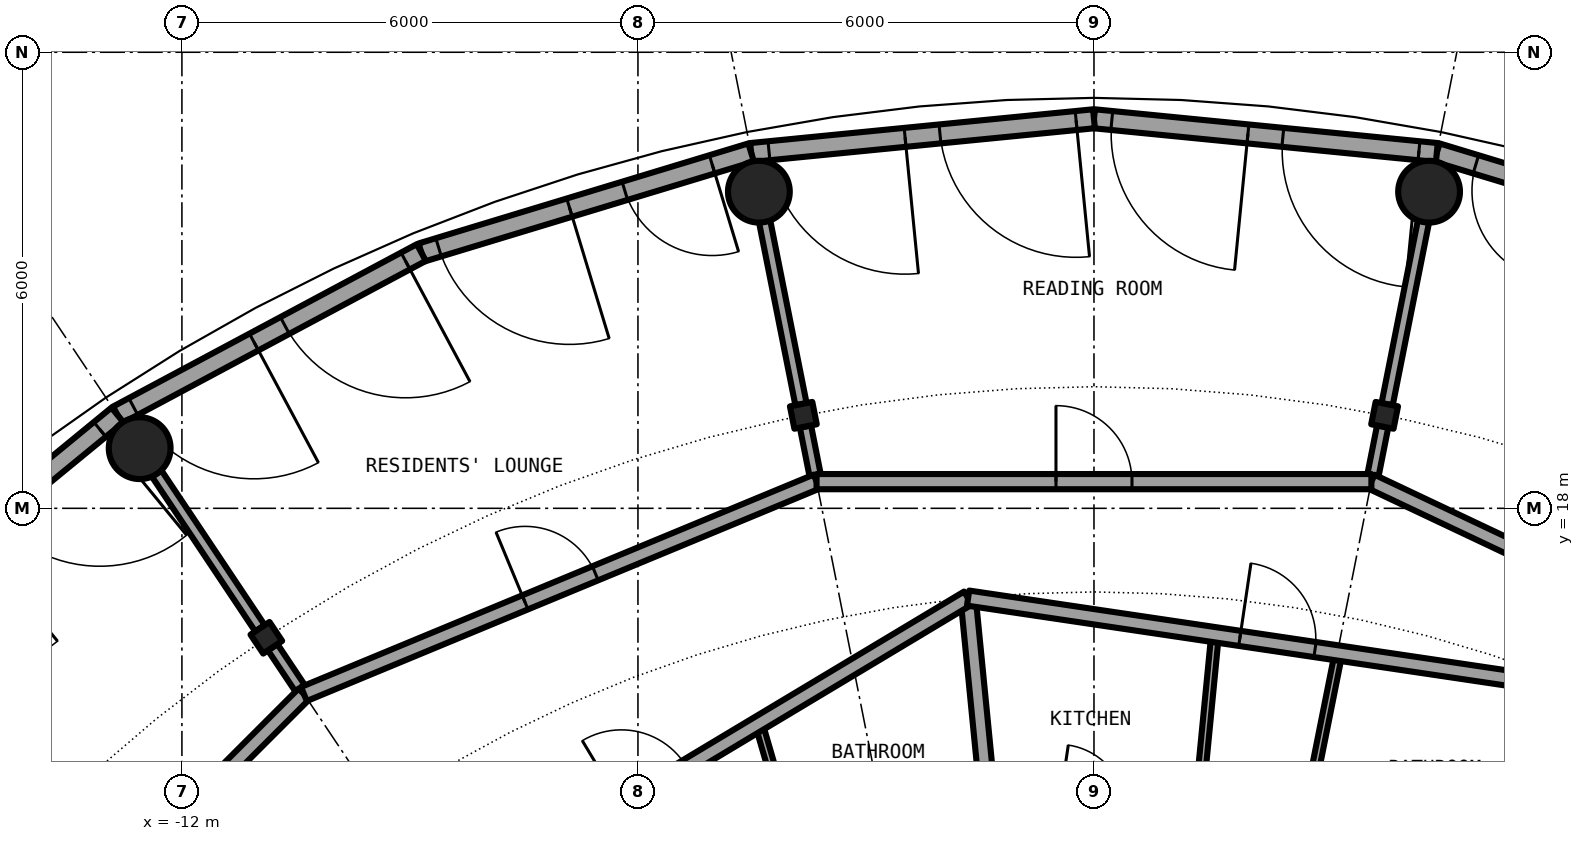
"""IFC4 building model, lengths in metres.
Left out: names, types, materials, properties, quantities, classifications, styles, units other than length and angle.
Written with IfcOpenShell. Run it as: python <this file> out.ifc"""

import sys

from ifc_helpers import new_model, si_unit, direction, frame, frame_2d, origin, origin_2d, place, context, subcontext, project, spatial, rectangle, hollow_circle, i_section, extrude, element, fill, save


model = new_model("IFC4")
c1 = context("Model", 3, precision=1e-05, world=origin(), true_north=direction((0.0, 1.0)))
c2 = subcontext(c1, "Body", "Model", "MODEL_VIEW")
j1 = project(units=[si_unit("LENGTHUNIT", "METRE"), si_unit("PLANEANGLEUNIT", "RADIAN")], contexts=[c1])
p1 = place(None, origin())
s1 = spatial("IfcSite", under=j1, at=p1, CompositionType="ELEMENT")
p2 = place(p1, origin())
s2 = spatial("IfcBuilding", under=s1, at=p2, CompositionType="ELEMENT")
p3 = place(p2, frame((0.0, 0.0, 249.3)))
s3 = spatial("IfcBuildingStorey", under=s2, at=p3, CompositionType="ELEMENT", Elevation=249.3)
for number, where, z_axis, x_axis in (
    (1, (4.409, 22.166, 0.0), (0.0, 0.0, 1.0), (1.0, 0.0, 0.0)),
    (2, (-4.409, 22.166, 0.0), (0.0, 0.0, 1.0), (1.0, 0.0, 0.0)),
    (3, (-12.556, 18.791, 0.0), (0.0, 0.0, 1.0), (1.0, 0.0, 0.0)),
):
    element("IfcColumn", number, at=place(p3, frame(where, z_axis=z_axis, x_axis=x_axis)), inside=s3, PredefinedType="COLUMN", context=c2, shape_type="SweptSolid", body=[
        extrude(hollow_circle(Radius=0.406, WallThickness=0.03, at=origin_2d()), origin(), (0.0, 0.0, 1.0), 3.05),
    ])
for number, where, z_axis, x_axis in (
    (4, (3.824, 19.223, 0.0), (0.0, 0.0, 1.0), (0.195, 0.981, 0.0)),
    (5, (-3.824, 19.223, 0.0), (0.0, 0.0, 1.0), (-0.195, 0.981, 0.0)),
    (6, (-10.889, 16.297, 0.0), (0.0, 0.0, 1.0), (-0.556, 0.831, 0.0)),
):
    element("IfcColumn", number, at=place(p3, frame(where, z_axis=z_axis, x_axis=x_axis)), inside=s3, PredefinedType="COLUMN", context=c2, shape_type="SweptSolid", body=[
        extrude(i_section(OverallWidth=0.3, OverallDepth=0.3, WebThickness=0.011, FlangeThickness=0.019, FilletRadius=0.027, at=origin_2d()), origin(), (0.0, 0.0, 1.0), 3.05),
    ])
p4 = place(p3, frame((8.85, 21.365, 0.0), z_axis=(0.0, 0.0, 1.0), x_axis=(-0.956960982965, 0.290216603735, 0.0)))
e7 = element("IfcWall", 7, at=p4, inside=s3, PredefinedType="SOLIDWALL", context=c2, shape_type="SweptSolid", body=[
    extrude(rectangle(XDim=4.534, YDim=0.25, at=frame_2d((2.267, 0.0))), origin(), (0.0, 0.0, 1.0), 2.7),
])
p5 = place(p4, frame((0.236, 0.0, 0.0)))
e8 = element("IfcOpeningElement", 8, at=p5, cuts=e7, PredefinedType="OPENING", context=c2, shape_type="SweptSolid", body=[
    extrude(rectangle(XDim=1.8, YDim=2.2, at=frame_2d((0.9, 1.1))), frame((0.0, 0.135, 0.0), z_axis=(0.0, -1.0, 0.0), x_axis=(1.0, 0.0, 0.0)), (0.0, 0.0, 1.0), 0.27),
])
p6 = place(p4, frame((2.797, 0.0, 0.0)))
e9 = element("IfcOpeningElement", 9, at=p6, cuts=e7, PredefinedType="OPENING", context=c2, shape_type="SweptSolid", body=[
    extrude(rectangle(XDim=1.2, YDim=2.2, at=frame_2d((0.6, 1.1))), frame((0.0, 0.135, 0.0), z_axis=(0.0, -1.0, 0.0), x_axis=(1.0, 0.0, 0.0)), (0.0, 0.0, 1.0), 0.27),
])
p7 = place(p3, frame((4.511, 22.681, 0.0), z_axis=(0.0, 0.0, 1.0), x_axis=(-0.995189063612, 0.097973096645, 0.0)))
e10 = element("IfcWall", 10, at=p7, inside=s3, PredefinedType="SOLIDWALL", context=c2, shape_type="SweptSolid", body=[
    extrude(rectangle(XDim=4.533, YDim=0.25, at=frame_2d((2.266, 0.0))), origin(), (0.0, 0.0, 1.0), 2.7),
])
p8 = place(p7, frame((0.236, 0.0, 0.0)))
e11 = element("IfcOpeningElement", 11, at=p8, cuts=e10, PredefinedType="OPENING", context=c2, shape_type="SweptSolid", body=[
    extrude(rectangle(XDim=1.8, YDim=2.2, at=frame_2d((0.9, 1.1))), frame((0.0, 0.135, 0.0), z_axis=(0.0, -1.0, 0.0), x_axis=(1.0, 0.0, 0.0)), (0.0, 0.0, 1.0), 0.27),
])
p9 = place(p7, frame((2.497, 0.0, 0.0)))
e12 = element("IfcOpeningElement", 12, at=p9, cuts=e10, PredefinedType="OPENING", context=c2, shape_type="SweptSolid", body=[
    extrude(rectangle(XDim=1.8, YDim=2.2, at=frame_2d((0.9, 1.1))), frame((0.0, 0.135, 0.0), z_axis=(0.0, -1.0, 0.0), x_axis=(1.0, 0.0, 0.0)), (0.0, 0.0, 1.0), 0.27),
])
p10 = place(p3, frame((0.0, 23.125, 0.0), z_axis=(0.0, 0.0, 1.0), x_axis=(-0.995189063612, -0.097973096645, 0.0)))
e13 = element("IfcWall", 13, at=p10, inside=s3, PredefinedType="SOLIDWALL", context=c2, shape_type="SweptSolid", body=[
    extrude(rectangle(XDim=4.533, YDim=0.25, at=frame_2d((2.266, 0.0))), origin(), (0.0, 0.0, 1.0), 2.7),
])
p11 = place(p10, frame((0.236, 0.0, 0.0)))
e14 = element("IfcOpeningElement", 14, at=p11, cuts=e13, PredefinedType="OPENING", context=c2, shape_type="SweptSolid", body=[
    extrude(rectangle(XDim=1.8, YDim=2.2, at=frame_2d((0.9, 1.1))), frame((0.0, 0.135, 0.0), z_axis=(0.0, -1.0, 0.0), x_axis=(1.0, 0.0, 0.0)), (0.0, 0.0, 1.0), 0.27),
])
p12 = place(p10, frame((2.497, 0.0, 0.0)))
e15 = element("IfcOpeningElement", 15, at=p12, cuts=e13, PredefinedType="OPENING", context=c2, shape_type="SweptSolid", body=[
    extrude(rectangle(XDim=1.8, YDim=2.2, at=frame_2d((0.9, 1.1))), frame((0.0, 0.135, 0.0), z_axis=(0.0, -1.0, 0.0), x_axis=(1.0, 0.0, 0.0)), (0.0, 0.0, 1.0), 0.27),
])
p13 = place(p3, frame((-4.511, 22.681, 0.0), z_axis=(0.0, 0.0, 1.0), x_axis=(-0.956960982965, -0.290216603735, 0.0)))
e16 = element("IfcWall", 16, at=p13, inside=s3, PredefinedType="SOLIDWALL", context=c2, shape_type="SweptSolid", body=[
    extrude(rectangle(XDim=4.534, YDim=0.25, at=frame_2d((2.267, 0.0))), origin(), (0.0, 0.0, 1.0), 2.7),
])
p14 = place(p13, frame((0.536, 0.0, 0.0)))
e17 = element("IfcOpeningElement", 17, at=p14, cuts=e16, PredefinedType="OPENING", context=c2, shape_type="SweptSolid", body=[
    extrude(rectangle(XDim=1.2, YDim=2.2, at=frame_2d((0.6, 1.1))), frame((0.0, 0.135, 0.0), z_axis=(0.0, -1.0, 0.0), x_axis=(1.0, 0.0, 0.0)), (0.0, 0.0, 1.0), 0.27),
])
p15 = place(p13, frame((2.497, 0.0, 0.0)))
e18 = element("IfcOpeningElement", 18, at=p15, cuts=e16, PredefinedType="OPENING", context=c2, shape_type="SweptSolid", body=[
    extrude(rectangle(XDim=1.8, YDim=2.2, at=frame_2d((0.9, 1.1))), frame((0.0, 0.135, 0.0), z_axis=(0.0, -1.0, 0.0), x_axis=(1.0, 0.0, 0.0)), (0.0, 0.0, 1.0), 0.27),
])
p16 = place(p3, frame((-8.85, 21.365, 0.0), z_axis=(0.0, 0.0, 1.0), x_axis=(-0.881912752543, -0.471412660947, 0.0)))
e19 = element("IfcWall", 19, at=p16, inside=s3, PredefinedType="SOLIDWALL", context=c2, shape_type="SweptSolid", body=[
    extrude(rectangle(XDim=4.533, YDim=0.25, at=frame_2d((2.267, 0.0))), origin(), (0.0, 0.0, 1.0), 2.7),
])
p17 = place(p16, frame((0.236, 0.0, 0.0)))
e20 = element("IfcOpeningElement", 20, at=p17, cuts=e19, PredefinedType="OPENING", context=c2, shape_type="SweptSolid", body=[
    extrude(rectangle(XDim=1.8, YDim=2.2, at=frame_2d((0.9, 1.1))), frame((0.0, 0.135, 0.0), z_axis=(0.0, -1.0, 0.0), x_axis=(1.0, 0.0, 0.0)), (0.0, 0.0, 1.0), 0.27),
])
p18 = place(p16, frame((2.497, 0.0, 0.0)))
e21 = element("IfcOpeningElement", 21, at=p18, cuts=e19, PredefinedType="OPENING", context=c2, shape_type="SweptSolid", body=[
    extrude(rectangle(XDim=1.8, YDim=2.2, at=frame_2d((0.9, 1.1))), frame((0.0, 0.135, 0.0), z_axis=(0.0, -1.0, 0.0), x_axis=(1.0, 0.0, 0.0)), (0.0, 0.0, 1.0), 0.27),
])
p19 = place(p3, frame((-12.848, 19.228, 0.0), z_axis=(0.0, 0.0, 1.0), x_axis=(-0.772989395532, -0.634418942337, 0.0)))
e22 = element("IfcWall", 22, at=p19, inside=s3, PredefinedType="SOLIDWALL", context=c2, shape_type="SweptSolid", body=[
    extrude(rectangle(XDim=4.533, YDim=0.25, at=frame_2d((2.267, 0.0))), origin(), (0.0, 0.0, 1.0), 2.7),
])
p20 = place(p19, frame((0.3, 0.0, 0.0)))
e23 = element("IfcOpeningElement", 23, at=p20, cuts=e22, PredefinedType="OPENING", context=c2, shape_type="SweptSolid", body=[
    extrude(rectangle(XDim=1.8, YDim=2.2, at=frame_2d((0.9, 1.1))), frame((0.0, 0.135, 0.0), z_axis=(0.0, -1.0, 0.0), x_axis=(1.0, 0.0, 0.0)), (0.0, 0.0, 1.0), 0.27),
])
p21 = place(p19, frame((2.497, 0.0, 0.0)))
e24 = element("IfcOpeningElement", 24, at=p21, cuts=e22, PredefinedType="OPENING", context=c2, shape_type="SweptSolid", body=[
    extrude(rectangle(XDim=1.8, YDim=2.2, at=frame_2d((0.9, 1.1))), frame((0.0, 0.135, 0.0), z_axis=(0.0, -1.0, 0.0), x_axis=(1.0, 0.0, 0.0)), (0.0, 0.0, 1.0), 0.27),
])
p22 = place(p3, frame((-12.334, 18.46, 0.0), z_axis=(0.0, 0.0, 1.0), x_axis=(0.55541269892, -0.831574851639, 0.0)))
e25 = element("IfcWall", 25, at=p22, inside=s3, PredefinedType="PARTITIONING", context=c2, shape_type="SweptSolid", body=[
    extrude(rectangle(XDim=2.451, YDim=0.15, at=frame_2d((1.225, 0.0))), origin(), (0.0, 0.0, 1.0), 2.7),
])
p23 = place(p3, frame((-10.806, 16.172, 0.0), z_axis=(0.0, 0.0, 1.0), x_axis=(0.55538538696, -0.831593092775, 0.0)))
e26 = element("IfcWall", 26, at=p23, inside=s3, PredefinedType="PARTITIONING", context=c2, shape_type="SweptSolid", body=[
    extrude(rectangle(XDim=0.74, YDim=0.15, at=frame_2d((0.37, 0.0))), origin(), (0.0, 0.0, 1.0), 2.7),
])
p24 = place(p3, frame((-4.411, 15.168, 0.0), z_axis=(0.0, 0.0, 1.0), x_axis=(0.279201466266, -0.960232545395, 0.0)))
e27 = element("IfcWall", 27, at=p24, inside=s3, PredefinedType="PARTITIONING", context=c2, shape_type="SweptSolid", body=[
    extrude(rectangle(XDim=2.524, YDim=0.1, at=frame_2d((1.262, 0.0))), origin(), (0.0, 0.0, 1.0), 2.7),
])
p25 = place(p3, frame((-4.333, 21.774, 0.0), z_axis=(0.0, 0.0, 1.0), x_axis=(0.195043256877, -0.980794641068, 0.0)))
e28 = element("IfcWall", 28, at=p25, inside=s3, PredefinedType="PARTITIONING", context=c2, shape_type="SweptSolid", body=[
    extrude(rectangle(XDim=2.451, YDim=0.15, at=frame_2d((1.226, 0.0))), origin(), (0.0, 0.0, 1.0), 2.7),
])
p26 = place(p3, frame((-3.796, 19.076, 0.0), z_axis=(0.0, 0.0, 1.0), x_axis=(0.194591088663, -0.980884452019, 0.0)))
e29 = element("IfcWall", 29, at=p26, inside=s3, PredefinedType="PARTITIONING", context=c2, shape_type="SweptSolid", body=[
    extrude(rectangle(XDim=0.739, YDim=0.15, at=frame_2d((0.37, 0.0))), origin(), (0.0, 0.0, 1.0), 2.7),
])
p27 = place(p3, frame((-1.656, 16.819, 0.0), z_axis=(0.0, 0.0, 1.0), x_axis=(0.097815726767, -0.995204543597, 0.0)))
e30 = element("IfcWall", 30, at=p27, inside=s3, PredefinedType="PARTITIONING", context=c2, shape_type="SweptSolid", body=[
    extrude(rectangle(XDim=9.18, YDim=0.2, at=frame_2d((4.59, 0.0))), origin(), (0.0, 0.0, 1.0), 2.7),
])
p28 = place(p3, frame((1.339, 13.727, 0.0), z_axis=(0.0, 0.0, 1.0), x_axis=(0.096830025237, 0.995300932489, 0.0)))
e31 = element("IfcWall", 31, at=p28, inside=s3, PredefinedType="PARTITIONING", context=c2, shape_type="SweptSolid", body=[
    extrude(rectangle(XDim=2.622, YDim=0.1, at=frame_2d((1.311, 0.0))), origin(), (0.0, 0.0, 1.0), 2.7),
])
p29 = place(p3, frame((2.704, 13.524, 0.0), z_axis=(0.0, 0.0, 1.0), x_axis=(0.195937128464, 0.980616460034, 0.0)))
e32 = element("IfcWall", 32, at=p29, inside=s3, PredefinedType="PARTITIONING", context=c2, shape_type="SweptSolid", body=[
    extrude(rectangle(XDim=2.623, YDim=0.1, at=frame_2d((1.312, 0.0))), origin(), (0.0, 0.0, 1.0), 2.7),
])
p30 = place(p3, frame((2.955, 7.132, 0.0), z_axis=(0.0, 0.0, 1.0), x_axis=(0.382556139466, 0.923932248683, 0.0)))
e33 = element("IfcWall", 33, at=p30, inside=s3, PredefinedType="PARTITIONING", context=c2, shape_type="SweptSolid", body=[
    extrude(rectangle(XDim=9.18, YDim=0.2, at=frame_2d((4.59, 0.0))), origin(), (0.0, 0.0, 1.0), 2.7),
])
p31 = place(p3, frame((3.654, 18.35, 0.0), z_axis=(0.0, 0.0, 1.0), x_axis=(0.194656627734, 0.980871447887, 0.0)))
e34 = element("IfcWall", 34, at=p31, inside=s3, PredefinedType="PARTITIONING", context=c2, shape_type="SweptSolid", body=[
    extrude(rectangle(XDim=0.74, YDim=0.15, at=frame_2d((0.37, 0.0))), origin(), (0.0, 0.0, 1.0), 2.7),
])
p32 = place(p3, frame((3.857, 19.37, 0.0), z_axis=(0.0, 0.0, 1.0), x_axis=(0.195043256877, 0.980794641068, 0.0)))
e35 = element("IfcWall", 35, at=p32, inside=s3, PredefinedType="PARTITIONING", context=c2, shape_type="SweptSolid", body=[
    extrude(rectangle(XDim=2.451, YDim=0.15, at=frame_2d((1.226, 0.0))), origin(), (0.0, 0.0, 1.0), 2.7),
])
p33 = place(p3, frame((-14.052, 9.389, 0.0), z_axis=(0.0, 0.0, 1.0), x_axis=(0.857683679102, 0.51417769944, 0.0)))
e36 = element("IfcWall", 36, at=p33, inside=s3, PredefinedType="PARTITIONING", context=c2, shape_type="SweptSolid", body=[
    extrude(rectangle(XDim=14.451, YDim=0.2, at=frame_2d((7.225, 0.0))), origin(), (0.0, 0.0, 1.0), 2.7),
])
p34 = place(p33, frame((9.134, 0.0, 0.0)))
e37 = element("IfcOpeningElement", 37, at=p34, cuts=e36, PredefinedType="OPENING", context=c2, shape_type="SweptSolid", body=[
    extrude(rectangle(XDim=1.0, YDim=2.3, at=frame_2d((0.5, 1.15))), frame((0.0, 0.11, 0.0), z_axis=(0.0, -1.0, 0.0), x_axis=(1.0, 0.0, 0.0)), (0.0, 0.0, 1.0), 0.22),
])
p35 = place(p3, frame((-1.656, 16.819, 0.0), z_axis=(0.0, 0.0, 1.0), x_axis=(0.989174071716, -0.146746910856, 0.0)))
e38 = element("IfcWall", 38, at=p35, inside=s3, PredefinedType="PARTITIONING", context=c2, shape_type="SweptSolid", body=[
    extrude(rectangle(XDim=8.212, YDim=0.2, at=frame_2d((4.106, 0.0))), origin(), (0.0, 0.0, 1.0), 2.7),
])
p36 = place(p35, frame((3.614, 0.0, 0.0)))
e39 = element("IfcOpeningElement", 39, at=p36, cuts=e38, PredefinedType="OPENING", context=c2, shape_type="SweptSolid", body=[
    extrude(rectangle(XDim=1.0, YDim=2.3, at=frame_2d((0.5, 1.15))), frame((0.0, 0.11, 0.0), z_axis=(0.0, -1.0, 0.0), x_axis=(1.0, 0.0, 0.0)), (0.0, 0.0, 1.0), 0.22),
])
p37 = place(p3, frame((3.65, 18.351, 0.0), z_axis=(0.0, 0.0, 1.0), x_axis=(0.904027935406, -0.427473381634, 0.0)))
e40 = element("IfcWall", 40, at=p37, inside=s3, PredefinedType="PARTITIONING", context=c2, shape_type="SweptSolid", body=[
    extrude(rectangle(XDim=9.093, YDim=0.2, at=frame_2d((4.546, 0.0))), origin(), (0.0, 0.0, 1.0), 2.7),
])
p38 = place(p37, frame((4.046, 0.0, 0.0)))
e41 = element("IfcOpeningElement", 41, at=p38, cuts=e40, PredefinedType="OPENING", context=c2, shape_type="SweptSolid", body=[
    extrude(rectangle(XDim=1.0, YDim=2.3, at=frame_2d((0.5, 1.15))), frame((0.0, 0.11, 0.0), z_axis=(0.0, -1.0, 0.0), x_axis=(1.0, 0.0, 0.0)), (0.0, 0.0, 1.0), 0.22),
])
p39 = place(p3, frame((-15.557, 10.395, 0.0), z_axis=(0.0, 0.0, 1.0), x_axis=(0.707106781187, 0.707106781187, 0.0)))
e42 = element("IfcWall", 42, at=p39, inside=s3, PredefinedType="PARTITIONING", context=c2, shape_type="SweptSolid", body=[
    extrude(rectangle(XDim=7.3, YDim=0.2, at=frame_2d((3.65, 0.0))), origin(), (0.0, 0.0, 1.0), 2.7),
])
p40 = place(p39, frame((3.15, 0.0, 0.0)))
e43 = element("IfcOpeningElement", 43, at=p40, cuts=e42, PredefinedType="OPENING", context=c2, shape_type="SweptSolid", body=[
    extrude(rectangle(XDim=1.0, YDim=2.3, at=frame_2d((0.5, 1.15))), frame((0.0, 0.11, 0.0), z_axis=(0.0, -1.0, 0.0), x_axis=(1.0, 0.0, 0.0)), (0.0, 0.0, 1.0), 0.22),
])
p41 = place(p3, frame((-10.395, 15.557, 0.0), z_axis=(0.0, 0.0, 1.0), x_axis=(0.923866436038, 0.382715048518, 0.0)))
e44 = element("IfcWall", 44, at=p41, inside=s3, PredefinedType="PARTITIONING", context=c2, shape_type="SweptSolid", body=[
    extrude(rectangle(XDim=7.301, YDim=0.2, at=frame_2d((3.65, 0.0))), origin(), (0.0, 0.0, 1.0), 2.7),
])
p42 = place(p41, frame((3.15, 0.0, 0.0)))
e45 = element("IfcOpeningElement", 45, at=p42, cuts=e44, PredefinedType="OPENING", context=c2, shape_type="SweptSolid", body=[
    extrude(rectangle(XDim=1.0, YDim=2.3, at=frame_2d((0.5, 1.15))), frame((0.0, 0.11, 0.0), z_axis=(0.0, -1.0, 0.0), x_axis=(1.0, 0.0, 0.0)), (0.0, 0.0, 1.0), 0.22),
])
p43 = place(p3, frame((-3.65, 18.351, 0.0), z_axis=(0.0, 0.0, 1.0), x_axis=(1.0, 0.0, 0.0)))
e46 = element("IfcWall", 46, at=p43, inside=s3, PredefinedType="PARTITIONING", context=c2, shape_type="SweptSolid", body=[
    extrude(rectangle(XDim=7.3, YDim=0.2, at=frame_2d((3.65, 0.0))), origin(), (0.0, 0.0, 1.0), 2.7),
])
p44 = place(p43, frame((3.15, 0.0, 0.0)))
e47 = element("IfcOpeningElement", 47, at=p44, cuts=e46, PredefinedType="OPENING", context=c2, shape_type="SweptSolid", body=[
    extrude(rectangle(XDim=1.0, YDim=2.3, at=frame_2d((0.5, 1.15))), frame((0.0, 0.11, 0.0), z_axis=(0.0, -1.0, 0.0), x_axis=(1.0, 0.0, 0.0)), (0.0, 0.0, 1.0), 0.22),
])
p45 = place(p6, origin())
e48 = element("IfcDoor", 48, at=p45, inside=s3, OperationType="SINGLE_SWING_LEFT", PredefinedType="DOOR", context=c2, shape_type="SweptSolid", body=[
    extrude(rectangle(XDim=1.2, YDim=2.2, at=frame_2d((0.6, 1.1))), frame((0.0, 0.025, 0.0), z_axis=(0.0, -1.0, 0.0), x_axis=(1.0, 0.0, 0.0)), (0.0, 0.0, 1.0), 0.05),
])
fill(e9, e48)
p46 = place(p8, origin())
e49 = element("IfcDoor", 49, at=p46, inside=s3, OperationType="SINGLE_SWING_LEFT", PredefinedType="DOOR", context=c2, shape_type="SweptSolid", body=[
    extrude(rectangle(XDim=1.8, YDim=2.2, at=frame_2d((0.9, 1.1))), frame((0.0, 0.025, 0.0), z_axis=(0.0, -1.0, 0.0), x_axis=(1.0, 0.0, 0.0)), (0.0, 0.0, 1.0), 0.05),
])
fill(e11, e49)
p47 = place(p9, origin())
e50 = element("IfcDoor", 50, at=p47, inside=s3, OperationType="SINGLE_SWING_LEFT", PredefinedType="DOOR", context=c2, shape_type="SweptSolid", body=[
    extrude(rectangle(XDim=1.8, YDim=2.2, at=frame_2d((0.9, 1.1))), frame((0.0, 0.025, 0.0), z_axis=(0.0, -1.0, 0.0), x_axis=(1.0, 0.0, 0.0)), (0.0, 0.0, 1.0), 0.05),
])
fill(e12, e50)
p48 = place(p11, origin())
e51 = element("IfcDoor", 51, at=p48, inside=s3, OperationType="SINGLE_SWING_LEFT", PredefinedType="DOOR", context=c2, shape_type="SweptSolid", body=[
    extrude(rectangle(XDim=1.8, YDim=2.2, at=frame_2d((0.9, 1.1))), frame((0.0, 0.025, 0.0), z_axis=(0.0, -1.0, 0.0), x_axis=(1.0, 0.0, 0.0)), (0.0, 0.0, 1.0), 0.05),
])
fill(e14, e51)
p49 = place(p12, origin())
e52 = element("IfcDoor", 52, at=p49, inside=s3, OperationType="SINGLE_SWING_LEFT", PredefinedType="DOOR", context=c2, shape_type="SweptSolid", body=[
    extrude(rectangle(XDim=1.8, YDim=2.2, at=frame_2d((0.9, 1.1))), frame((0.0, 0.025, 0.0), z_axis=(0.0, -1.0, 0.0), x_axis=(1.0, 0.0, 0.0)), (0.0, 0.0, 1.0), 0.05),
])
fill(e15, e52)
p50 = place(p14, origin())
e53 = element("IfcDoor", 53, at=p50, inside=s3, OperationType="SINGLE_SWING_LEFT", PredefinedType="DOOR", context=c2, shape_type="SweptSolid", body=[
    extrude(rectangle(XDim=1.2, YDim=2.2, at=frame_2d((0.6, 1.1))), frame((0.0, 0.025, 0.0), z_axis=(0.0, -1.0, 0.0), x_axis=(1.0, 0.0, 0.0)), (0.0, 0.0, 1.0), 0.05),
])
fill(e17, e53)
p51 = place(p15, origin())
e54 = element("IfcDoor", 54, at=p51, inside=s3, OperationType="SINGLE_SWING_LEFT", PredefinedType="DOOR", context=c2, shape_type="SweptSolid", body=[
    extrude(rectangle(XDim=1.8, YDim=2.2, at=frame_2d((0.9, 1.1))), frame((0.0, 0.025, 0.0), z_axis=(0.0, -1.0, 0.0), x_axis=(1.0, 0.0, 0.0)), (0.0, 0.0, 1.0), 0.05),
])
fill(e18, e54)
p52 = place(p17, origin())
e55 = element("IfcDoor", 55, at=p52, inside=s3, OperationType="SINGLE_SWING_LEFT", PredefinedType="DOOR", context=c2, shape_type="SweptSolid", body=[
    extrude(rectangle(XDim=1.8, YDim=2.2, at=frame_2d((0.9, 1.1))), frame((0.0, 0.025, 0.0), z_axis=(0.0, -1.0, 0.0), x_axis=(1.0, 0.0, 0.0)), (0.0, 0.0, 1.0), 0.05),
])
fill(e20, e55)
p53 = place(p18, origin())
e56 = element("IfcDoor", 56, at=p53, inside=s3, OperationType="SINGLE_SWING_LEFT", PredefinedType="DOOR", context=c2, shape_type="SweptSolid", body=[
    extrude(rectangle(XDim=1.8, YDim=2.2, at=frame_2d((0.9, 1.1))), frame((0.0, 0.025, 0.0), z_axis=(0.0, -1.0, 0.0), x_axis=(1.0, 0.0, 0.0)), (0.0, 0.0, 1.0), 0.05),
])
fill(e21, e56)
p54 = place(p20, origin())
e57 = element("IfcDoor", 57, at=p54, inside=s3, OperationType="SINGLE_SWING_LEFT", PredefinedType="DOOR", context=c2, shape_type="SweptSolid", body=[
    extrude(rectangle(XDim=1.8, YDim=2.2, at=frame_2d((0.9, 1.1))), frame((0.0, 0.025, 0.0), z_axis=(0.0, -1.0, 0.0), x_axis=(1.0, 0.0, 0.0)), (0.0, 0.0, 1.0), 0.05),
])
fill(e23, e57)
p55 = place(p44, origin())
e58 = element("IfcDoor", 58, at=p55, inside=s3, OperationType="SINGLE_SWING_LEFT", PredefinedType="DOOR", context=c2, shape_type="SweptSolid", body=[
    extrude(rectangle(XDim=1.0, YDim=2.3, at=frame_2d((0.5, 1.15))), frame((0.0, 0.025, 0.0), z_axis=(0.0, -1.0, 0.0), x_axis=(1.0, 0.0, 0.0)), (0.0, 0.0, 1.0), 0.05),
])
fill(e47, e58)
p56 = place(p42, origin())
e59 = element("IfcDoor", 59, at=p56, inside=s3, OperationType="SINGLE_SWING_LEFT", PredefinedType="DOOR", context=c2, shape_type="SweptSolid", body=[
    extrude(rectangle(XDim=1.0, YDim=2.3, at=frame_2d((0.5, 1.15))), frame((0.0, 0.025, 0.0), z_axis=(0.0, -1.0, 0.0), x_axis=(1.0, 0.0, 0.0)), (0.0, 0.0, 1.0), 0.05),
])
fill(e45, e59)
p57 = place(p36, origin())
e60 = element("IfcDoor", 60, at=p57, inside=s3, OperationType="SINGLE_SWING_RIGHT", PredefinedType="DOOR", context=c2, shape_type="SweptSolid", body=[
    extrude(rectangle(XDim=1.0, YDim=2.3, at=frame_2d((0.5, 1.15))), frame((0.0, 0.025, 0.0), z_axis=(0.0, -1.0, 0.0), x_axis=(1.0, 0.0, 0.0)), (0.0, 0.0, 1.0), 0.05),
])
fill(e39, e60)
save(model, sys.argv[1])
